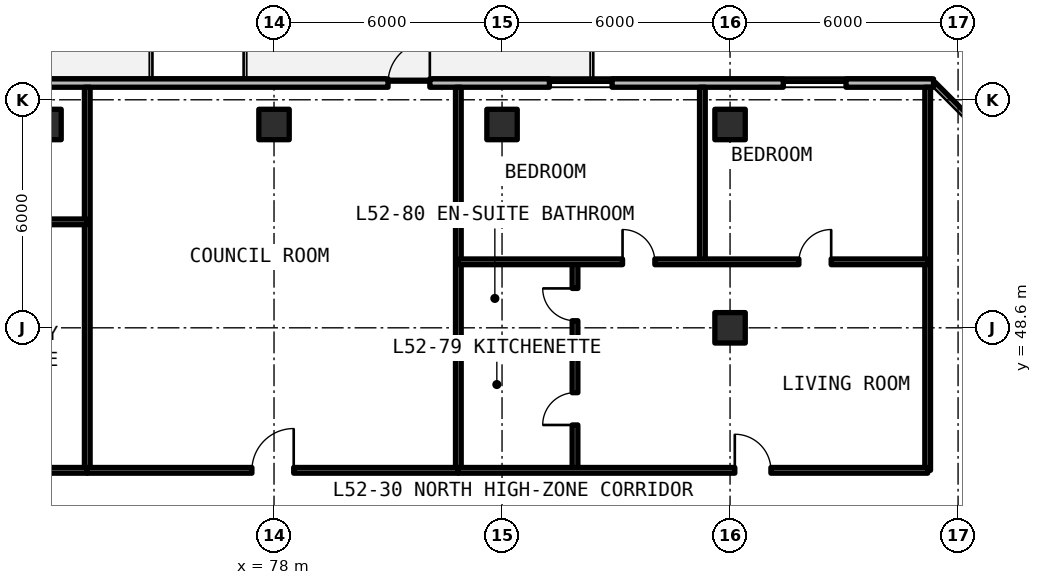
"""IFC4 building model, lengths in metres.
Left out: names, types, materials, properties, quantities, classifications, styles, units other than length and angle.
Written with IfcOpenShell. Run it as: python <this file> out.ifc"""

import sys

from ifc_helpers import new_model, si_unit, direction, frame, frame_2d, origin, origin_2d, place, context, subcontext, project, spatial, rectangle, extrude, element, fill, save


model = new_model("IFC4")
c1 = context("Model", 3, precision=1e-05, world=origin(), true_north=direction((0.0, 1.0)))
c2 = subcontext(c1, "Body", "Model", "MODEL_VIEW")
j1 = project(units=[si_unit("LENGTHUNIT", "METRE"), si_unit("PLANEANGLEUNIT", "RADIAN")], contexts=[c1])
p1 = place(None, origin())
s1 = spatial("IfcSite", under=j1, at=p1, CompositionType="ELEMENT")
p2 = place(p1, origin())
s2 = spatial("IfcBuilding", under=s1, at=p2, CompositionType="ELEMENT")
p3 = place(p2, frame((0.0, 0.0, 188.43)))
s3 = spatial("IfcBuildingStorey", under=s2, at=p3, CompositionType="ELEMENT", Elevation=188.43)
for number, where, z_axis, x_axis in (
    (1, (90.0, 48.6, 0.0), (0.0, 0.0, 1.0), (1.0, 0.0, 0.0)),
    (2, (72.0, 53.95, 0.0), (0.0, 0.0, 1.0), (1.0, 0.0, 0.0)),
    (3, (78.0, 53.95, 0.0), (0.0, 0.0, 1.0), (1.0, 0.0, 0.0)),
    (4, (84.0, 53.95, 0.0), (0.0, 0.0, 1.0), (1.0, 0.0, 0.0)),
    (5, (90.0, 53.95, 0.0), (0.0, 0.0, 1.0), (1.0, 0.0, 0.0)),
):
    element("IfcColumn", number, at=place(p3, frame(where, z_axis=z_axis, x_axis=x_axis)), inside=s3, PredefinedType="COLUMN", context=c2, shape_type="SweptSolid", body=[
        extrude(rectangle(XDim=0.8, YDim=0.8, at=origin_2d()), origin(), (0.0, 0.0, 1.0), 3.3),
    ])
p4 = place(p3, frame((95.354, 55.04, 0.0), z_axis=(0.0, 0.0, 1.0), x_axis=(-1.0, 0.0, 0.0)))
e6 = element("IfcWall", 6, at=p4, inside=s3, PredefinedType="SOLIDWALL", context=c2, shape_type="SweptSolid", body=[
    extrude(rectangle(XDim=43.244, YDim=0.22, at=frame_2d((21.622, 0.0))), origin(), (0.0, 0.0, 1.0), 3.08),
])
p5 = place(p4, frame((37.204, 0.0, 0.0)))
e7 = element("IfcOpeningElement", 7, at=p5, cuts=e6, PredefinedType="OPENING", context=c2, shape_type="SweptSolid", body=[
    extrude(rectangle(XDim=1.1, YDim=2.15, at=frame_2d((0.55, 1.075))), frame((0.0, 0.12, 0.0), z_axis=(0.0, -1.0, 0.0), x_axis=(1.0, 0.0, 0.0)), (0.0, 0.0, 1.0), 0.24),
])
p6 = place(p4, frame((25.104, 0.0, 0.0)))
e8 = element("IfcOpeningElement", 8, at=p6, cuts=e6, PredefinedType="OPENING", context=c2, shape_type="SweptSolid", body=[
    extrude(rectangle(XDim=1.1, YDim=2.15, at=frame_2d((0.55, 1.075))), frame((0.0, 0.12, 0.0), z_axis=(0.0, -1.0, 0.0), x_axis=(1.0, 0.0, 0.0)), (0.0, 0.0, 1.0), 0.24),
])
p7 = place(p4, frame((13.254, 0.0, 0.0)))
e9 = element("IfcOpeningElement", 9, at=p7, cuts=e6, PredefinedType="OPENING", context=c2, shape_type="SweptSolid", body=[
    extrude(rectangle(XDim=1.1, YDim=2.15, at=frame_2d((0.55, 1.075))), frame((0.0, 0.12, 0.0), z_axis=(0.0, -1.0, 0.0), x_axis=(1.0, 0.0, 0.0)), (0.0, 0.0, 1.0), 0.24),
])
p8 = place(p4, frame((32.815, 0.0, 0.78)))
e10 = element("IfcOpeningElement", 10, at=p8, cuts=e6, PredefinedType="OPENING", context=c2, shape_type="SweptSolid", body=[
    extrude(rectangle(XDim=1.65, YDim=1.66, at=frame_2d((0.825, 0.83))), frame((0.0, 0.12, 0.0), z_axis=(0.0, -1.0, 0.0), x_axis=(1.0, 0.0, 0.0)), (0.0, 0.0, 1.0), 0.24),
])
p9 = place(p4, frame((8.458, 0.0, 0.78)))
e11 = element("IfcOpeningElement", 11, at=p9, cuts=e6, PredefinedType="OPENING", context=c2, shape_type="SweptSolid", body=[
    extrude(rectangle(XDim=1.65, YDim=1.66, at=frame_2d((0.825, 0.83))), frame((0.0, 0.12, 0.0), z_axis=(0.0, -1.0, 0.0), x_axis=(1.0, 0.0, 0.0)), (0.0, 0.0, 1.0), 0.24),
])
p10 = place(p4, frame((2.303, 0.0, 0.78)))
e12 = element("IfcOpeningElement", 12, at=p10, cuts=e6, PredefinedType="OPENING", context=c2, shape_type="SweptSolid", body=[
    extrude(rectangle(XDim=1.65, YDim=1.66, at=frame_2d((0.825, 0.83))), frame((0.0, 0.12, 0.0), z_axis=(0.0, -1.0, 0.0), x_axis=(1.0, 0.0, 0.0)), (0.0, 0.0, 1.0), 0.24),
])
for number, where, z_axis, x_axis in (
    (13, (95.2, 44.85, 0.0), (0.0, 0.0, 1.0), (0.0, 1.0, 0.0)),
    (14, (73.086, 44.85, 0.0), (0.0, 0.0, 1.0), (0.0, 1.0, 0.0)),
):
    element("IfcWall", number, at=place(p3, frame(where, z_axis=z_axis, x_axis=x_axis)), inside=s3, PredefinedType="SOLIDWALL", context=c2, shape_type="SweptSolid", body=[
        extrude(rectangle(XDim=10.08, YDim=0.15, at=frame_2d((5.04, 0.0))), origin(), (0.0, 0.0, 1.0), 2.35),
    ])
p11 = place(p3, frame((64.757, 51.388, 0.0), z_axis=(0.0, 0.0, 1.0), x_axis=(1.0, 0.0, 0.0)))
e15 = element("IfcWall", 15, at=p11, inside=s3, PredefinedType="PARTITIONING", context=c2, shape_type="SweptSolid", body=[
    extrude(rectangle(XDim=8.329, YDim=0.15, at=frame_2d((4.165, 0.0))), origin(), (0.0, 0.0, 1.0), 2.35),
])
p12 = place(p11, frame((5.361, 0.0, 0.0)))
e16 = element("IfcOpeningElement", 16, at=p12, cuts=e15, PredefinedType="OPENING", context=c2, shape_type="SweptSolid", body=[
    extrude(rectangle(XDim=0.85, YDim=2.1, at=frame_2d((0.425, 1.05))), frame((0.0, 0.085, 0.0), z_axis=(0.0, -1.0, 0.0), x_axis=(1.0, 0.0, 0.0)), (0.0, 0.0, 1.0), 0.17),
])
p13 = place(p3, frame((64.757, 44.85, 0.0), z_axis=(0.0, 0.0, 1.0), x_axis=(1.0, 0.0, 0.0)))
e17 = element("IfcWall", 17, at=p13, inside=s3, PredefinedType="SOLIDWALL", context=c2, shape_type="SweptSolid", body=[
    extrude(rectangle(XDim=8.329, YDim=0.15, at=frame_2d((4.165, 0.0))), origin(), (0.0, 0.0, 1.0), 2.35),
])
p14 = place(p13, frame((5.311, 0.0, 0.0)))
e18 = element("IfcOpeningElement", 18, at=p14, cuts=e17, PredefinedType="OPENING", context=c2, shape_type="SweptSolid", body=[
    extrude(rectangle(XDim=0.95, YDim=2.15, at=frame_2d((0.475, 1.075))), frame((0.0, 0.085, 0.0), z_axis=(0.0, -1.0, 0.0), x_axis=(1.0, 0.0, 0.0)), (0.0, 0.0, 1.0), 0.17),
])
p15 = place(p3, frame((82.85, 44.85, 0.0), z_axis=(0.0, 0.0, 1.0), x_axis=(0.0, 1.0, 0.0)))
e19 = element("IfcWall", 19, at=p15, inside=s3, PredefinedType="SOLIDWALL", context=c2, shape_type="SweptSolid", body=[
    extrude(rectangle(XDim=10.08, YDim=0.15, at=frame_2d((5.04, 0.0))), origin(), (0.0, 0.0, 1.0), 2.35),
])
p16 = place(p3, frame((73.086, 44.85, 0.0), z_axis=(0.0, 0.0, 1.0), x_axis=(1.0, 0.0, 0.0)))
e20 = element("IfcWall", 20, at=p16, inside=s3, PredefinedType="SOLIDWALL", context=c2, shape_type="SweptSolid", body=[
    extrude(rectangle(XDim=9.765, YDim=0.15, at=frame_2d((4.882, 0.0))), origin(), (0.0, 0.0, 1.0), 2.35),
])
p17 = place(p16, frame((4.333, 0.0, 0.0)))
e21 = element("IfcOpeningElement", 21, at=p17, cuts=e20, PredefinedType="OPENING", context=c2, shape_type="SweptSolid", body=[
    extrude(rectangle(XDim=1.1, YDim=2.15, at=frame_2d((0.55, 1.075))), frame((0.0, 0.085, 0.0), z_axis=(0.0, -1.0, 0.0), x_axis=(1.0, 0.0, 0.0)), (0.0, 0.0, 1.0), 0.17),
])
p18 = place(p3, frame((82.85, 48.087, 0.0), z_axis=(0.0, 0.0, 1.0), x_axis=(1.0, 0.0, 0.0)))
e22 = element("IfcWall", 22, at=p18, inside=s3, PredefinedType="PARTITIONING", context=c2, shape_type="SweptSolid", body=[
    extrude(rectangle(XDim=3.07, YDim=0.15, at=frame_2d((1.535, 0.0))), origin(), (0.0, 0.0, 1.0), 2.35),
])
p19 = place(p3, frame((85.92, 44.85, 0.0), z_axis=(0.0, 0.0, 1.0), x_axis=(0.0, 1.0, 0.0)))
e23 = element("IfcWall", 23, at=p19, inside=s3, PredefinedType="PARTITIONING", context=c2, shape_type="SweptSolid", body=[
    extrude(rectangle(XDim=5.486, YDim=0.15, at=frame_2d((2.743, 0.0))), origin(), (0.0, 0.0, 1.0), 2.35),
])
p20 = place(p19, frame((1.193, 0.0, 0.0)))
e24 = element("IfcOpeningElement", 24, at=p20, cuts=e23, PredefinedType="OPENING", context=c2, shape_type="SweptSolid", body=[
    extrude(rectangle(XDim=0.85, YDim=2.1, at=frame_2d((0.425, 1.05))), frame((0.0, 0.085, 0.0), z_axis=(0.0, -1.0, 0.0), x_axis=(1.0, 0.0, 0.0)), (0.0, 0.0, 1.0), 0.17),
])
p21 = place(p19, frame((3.937, 0.0, 0.0)))
e25 = element("IfcOpeningElement", 25, at=p21, cuts=e23, PredefinedType="OPENING", context=c2, shape_type="SweptSolid", body=[
    extrude(rectangle(XDim=0.85, YDim=2.1, at=frame_2d((0.425, 1.05))), frame((0.0, 0.085, 0.0), z_axis=(0.0, -1.0, 0.0), x_axis=(1.0, 0.0, 0.0)), (0.0, 0.0, 1.0), 0.17),
])
p22 = place(p3, frame((89.272, 50.336, 0.0), z_axis=(0.0, 0.0, 1.0), x_axis=(0.0, 1.0, 0.0)))
e26 = element("IfcWall", 26, at=p22, inside=s3, PredefinedType="PARTITIONING", context=c2, shape_type="SweptSolid", body=[
    extrude(rectangle(XDim=4.594, YDim=0.15, at=frame_2d((2.297, 0.0))), origin(), (0.0, 0.0, 1.0), 2.35),
])
p23 = place(p3, frame((82.85, 50.336, 0.0), z_axis=(0.0, 0.0, 1.0), x_axis=(1.0, 0.0, 0.0)))
e27 = element("IfcWall", 27, at=p23, inside=s3, PredefinedType="PARTITIONING", context=c2, shape_type="SweptSolid", body=[
    extrude(rectangle(XDim=12.35, YDim=0.15, at=frame_2d((6.175, 0.0))), origin(), (0.0, 0.0, 1.0), 2.35),
])
p24 = place(p23, frame((4.321, 0.0, 0.0)))
e28 = element("IfcOpeningElement", 28, at=p24, cuts=e27, PredefinedType="OPENING", context=c2, shape_type="SweptSolid", body=[
    extrude(rectangle(XDim=0.85, YDim=2.1, at=frame_2d((0.425, 1.05))), frame((0.0, 0.085, 0.0), z_axis=(0.0, -1.0, 0.0), x_axis=(1.0, 0.0, 0.0)), (0.0, 0.0, 1.0), 0.17),
])
p25 = place(p23, frame((8.961, 0.0, 0.0)))
e29 = element("IfcOpeningElement", 29, at=p25, cuts=e27, PredefinedType="OPENING", context=c2, shape_type="SweptSolid", body=[
    extrude(rectangle(XDim=0.85, YDim=2.1, at=frame_2d((0.425, 1.05))), frame((0.0, 0.085, 0.0), z_axis=(0.0, -1.0, 0.0), x_axis=(1.0, 0.0, 0.0)), (0.0, 0.0, 1.0), 0.17),
])
p26 = place(p3, frame((82.85, 44.85, 0.0), z_axis=(0.0, 0.0, 1.0), x_axis=(1.0, 0.0, 0.0)))
e30 = element("IfcWall", 30, at=p26, inside=s3, PredefinedType="SOLIDWALL", context=c2, shape_type="SweptSolid", body=[
    extrude(rectangle(XDim=12.35, YDim=0.15, at=frame_2d((6.175, 0.0))), origin(), (0.0, 0.0, 1.0), 2.35),
])
p27 = place(p26, frame((7.275, 0.0, 0.0)))
e31 = element("IfcOpeningElement", 31, at=p27, cuts=e30, PredefinedType="OPENING", context=c2, shape_type="SweptSolid", body=[
    extrude(rectangle(XDim=0.95, YDim=2.15, at=frame_2d((0.475, 1.075))), frame((0.0, 0.085, 0.0), z_axis=(0.0, -1.0, 0.0), x_axis=(1.0, 0.0, 0.0)), (0.0, 0.0, 1.0), 0.17),
])
p28 = place(p7, frame((1.1, 0.0, 0.0), z_axis=(0.0, 0.0, 1.0), x_axis=(-1.0, 0.0, 0.0)))
e32 = element("IfcDoor", 32, at=p28, inside=s3, OperationType="SINGLE_SWING_RIGHT", PredefinedType="DOOR", context=c2, shape_type="SweptSolid", body=[
    extrude(rectangle(XDim=1.1, YDim=2.15, at=frame_2d((0.55, 1.075))), frame((0.0, 0.025, 0.0), z_axis=(0.0, -1.0, 0.0), x_axis=(1.0, 0.0, 0.0)), (0.0, 0.0, 1.0), 0.05),
])
fill(e9, e32)
p29 = place(p9, origin())
e33 = element("IfcWindow", 33, at=p29, inside=s3, PartitioningType="SINGLE_PANEL", PredefinedType="WINDOW", context=c2, shape_type="SweptSolid", body=[
    extrude(rectangle(XDim=1.65, YDim=1.66, at=frame_2d((0.825, 0.83))), frame((0.0, 0.03, 0.0), z_axis=(0.0, -1.0, 0.0), x_axis=(1.0, 0.0, 0.0)), (0.0, 0.0, 1.0), 0.06),
])
fill(e11, e33)
p30 = place(p10, origin())
e34 = element("IfcWindow", 34, at=p30, inside=s3, PartitioningType="SINGLE_PANEL", PredefinedType="WINDOW", context=c2, shape_type="SweptSolid", body=[
    extrude(rectangle(XDim=1.65, YDim=1.66, at=frame_2d((0.825, 0.83))), frame((0.0, 0.03, 0.0), z_axis=(0.0, -1.0, 0.0), x_axis=(1.0, 0.0, 0.0)), (0.0, 0.0, 1.0), 0.06),
])
fill(e12, e34)
p31 = place(p17, origin())
e35 = element("IfcDoor", 35, at=p31, inside=s3, OperationType="SINGLE_SWING_RIGHT", PredefinedType="DOOR", context=c2, shape_type="SweptSolid", body=[
    extrude(rectangle(XDim=1.1, YDim=2.15, at=frame_2d((0.55, 1.075))), frame((0.0, 0.025, 0.0), z_axis=(0.0, -1.0, 0.0), x_axis=(1.0, 0.0, 0.0)), (0.0, 0.0, 1.0), 0.05),
])
fill(e21, e35)
p32 = place(p20, origin())
e36 = element("IfcDoor", 36, at=p32, inside=s3, OperationType="SINGLE_SWING_LEFT", PredefinedType="DOOR", context=c2, shape_type="SweptSolid", body=[
    extrude(rectangle(XDim=0.85, YDim=2.1, at=frame_2d((0.425, 1.05))), frame((0.0, 0.025, 0.0), z_axis=(0.0, -1.0, 0.0), x_axis=(1.0, 0.0, 0.0)), (0.0, 0.0, 1.0), 0.05),
])
fill(e24, e36)
p33 = place(p21, origin())
e37 = element("IfcDoor", 37, at=p33, inside=s3, OperationType="SINGLE_SWING_RIGHT", PredefinedType="DOOR", context=c2, shape_type="SweptSolid", body=[
    extrude(rectangle(XDim=0.85, YDim=2.1, at=frame_2d((0.425, 1.05))), frame((0.0, 0.025, 0.0), z_axis=(0.0, -1.0, 0.0), x_axis=(1.0, 0.0, 0.0)), (0.0, 0.0, 1.0), 0.05),
])
fill(e25, e37)
p34 = place(p24, origin())
e38 = element("IfcDoor", 38, at=p34, inside=s3, OperationType="SINGLE_SWING_LEFT", PredefinedType="DOOR", context=c2, shape_type="SweptSolid", body=[
    extrude(rectangle(XDim=0.85, YDim=2.1, at=frame_2d((0.425, 1.05))), frame((0.0, 0.025, 0.0), z_axis=(0.0, -1.0, 0.0), x_axis=(1.0, 0.0, 0.0)), (0.0, 0.0, 1.0), 0.05),
])
fill(e28, e38)
p35 = place(p25, origin())
e39 = element("IfcDoor", 39, at=p35, inside=s3, OperationType="SINGLE_SWING_RIGHT", PredefinedType="DOOR", context=c2, shape_type="SweptSolid", body=[
    extrude(rectangle(XDim=0.85, YDim=2.1, at=frame_2d((0.425, 1.05))), frame((0.0, 0.025, 0.0), z_axis=(0.0, -1.0, 0.0), x_axis=(1.0, 0.0, 0.0)), (0.0, 0.0, 1.0), 0.05),
])
fill(e29, e39)
p36 = place(p27, origin())
e40 = element("IfcDoor", 40, at=p36, inside=s3, OperationType="SINGLE_SWING_LEFT", PredefinedType="DOOR", context=c2, shape_type="SweptSolid", body=[
    extrude(rectangle(XDim=0.95, YDim=2.15, at=frame_2d((0.475, 1.075))), frame((0.0, 0.025, 0.0), z_axis=(0.0, -1.0, 0.0), x_axis=(1.0, 0.0, 0.0)), (0.0, 0.0, 1.0), 0.05),
])
fill(e31, e40)
save(model, sys.argv[1])
